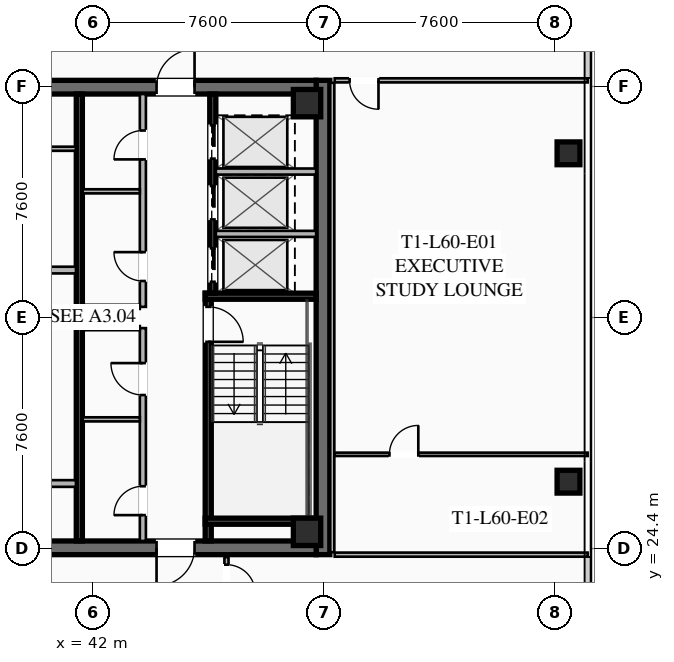
"""IFC4 building model, lengths in metres.
Left out: names, types, materials, properties, quantities, classifications, styles, units other than length and angle.
Written with IfcOpenShell. Run it as: python <this file> out.ifc"""

import sys

from ifc_helpers import new_model, si_unit, direction, frame, frame_2d, origin, origin_2d, place, context, subcontext, project, spatial, rectangle, hollow_rectangle, extrude, element, fill, save


model = new_model("IFC4")
c1 = context("Model", 3, precision=1e-05, world=origin(), true_north=direction((0.0, 1.0)))
c2 = subcontext(c1, "Body", "Model", "MODEL_VIEW")
j1 = project(units=[si_unit("LENGTHUNIT", "METRE"), si_unit("PLANEANGLEUNIT", "RADIAN")], contexts=[c1])
p1 = place(None, origin())
s1 = spatial("IfcSite", under=j1, at=p1, CompositionType="ELEMENT")
p2 = place(p1, origin())
s2 = spatial("IfcBuilding", under=s1, at=p2, CompositionType="ELEMENT")
p3 = place(p2, frame((0.0, 0.0, 221.95)))
s3 = spatial("IfcBuildingStorey", under=s2, at=p3, CompositionType="ELEMENT", Elevation=221.95)
p4 = place(p3, frame((49.575, 39.8, 0.0), z_axis=(0.0, 0.0, 1.0), x_axis=(0.0, -1.0, 0.0)))
e1 = element("IfcWall", 1, at=p4, inside=s3, PredefinedType="SHEAR", context=c2, shape_type="SweptSolid", body=[
    extrude(rectangle(XDim=15.6, YDim=0.45, at=frame_2d((7.8, 0.0))), origin(), (0.0, 0.0, 1.0), 3.55),
])
p5 = place(p3, frame((49.35, 24.425, 0.0), z_axis=(0.0, 0.0, 1.0), x_axis=(-1.0, 0.0, 0.0)))
e2 = element("IfcWall", 2, at=p5, inside=s3, PredefinedType="SHEAR", context=c2, shape_type="SweptSolid", body=[
    extrude(rectangle(XDim=14.7, YDim=0.45, at=frame_2d((7.35, 0.0))), origin(), (0.0, 0.0, 1.0), 3.55),
])
p6 = place(p5, frame((9.05, 0.0, 0.0)))
e3 = element("IfcOpeningElement", 3, at=p6, cuts=e2, PredefinedType="OPENING", context=c2, shape_type="SweptSolid", body=[
    extrude(rectangle(XDim=1.25, YDim=2.25, at=frame_2d((0.625, 1.125))), frame((0.0, 0.235, 0.0), z_axis=(0.0, -1.0, 0.0), x_axis=(1.0, 0.0, 0.0)), (0.0, 0.0, 1.0), 0.47),
])
p7 = place(p5, frame((4.0, 0.0, 0.0)))
e4 = element("IfcOpeningElement", 4, at=p7, cuts=e2, PredefinedType="OPENING", context=c2, shape_type="SweptSolid", body=[
    extrude(rectangle(XDim=1.25, YDim=2.25, at=frame_2d((0.625, 1.125))), frame((0.0, 0.235, 0.0), z_axis=(0.0, -1.0, 0.0), x_axis=(1.0, 0.0, 0.0)), (0.0, 0.0, 1.0), 0.47),
])
p8 = place(p3, frame((34.65, 39.575, 0.0), z_axis=(0.0, 0.0, 1.0), x_axis=(1.0, 0.0, 0.0)))
e5 = element("IfcWall", 5, at=p8, inside=s3, PredefinedType="SHEAR", context=c2, shape_type="SweptSolid", body=[
    extrude(rectangle(XDim=14.7, YDim=0.45, at=frame_2d((7.35, 0.0))), origin(), (0.0, 0.0, 1.0), 3.55),
])
p9 = place(p8, frame((4.4, 0.0, 0.0)))
e6 = element("IfcOpeningElement", 6, at=p9, cuts=e5, PredefinedType="OPENING", context=c2, shape_type="SweptSolid", body=[
    extrude(rectangle(XDim=1.25, YDim=2.25, at=frame_2d((0.625, 1.125))), frame((0.0, 0.235, 0.0), z_axis=(0.0, -1.0, 0.0), x_axis=(1.0, 0.0, 0.0)), (0.0, 0.0, 1.0), 0.47),
])
p10 = place(p8, frame((9.45, 0.0, 0.0)))
e7 = element("IfcOpeningElement", 7, at=p10, cuts=e5, PredefinedType="OPENING", context=c2, shape_type="SweptSolid", body=[
    extrude(rectangle(XDim=1.25, YDim=2.25, at=frame_2d((0.625, 1.125))), frame((0.0, 0.235, 0.0), z_axis=(0.0, -1.0, 0.0), x_axis=(1.0, 0.0, 0.0)), (0.0, 0.0, 1.0), 0.47),
])
for number, where, z_axis, x_axis in (
    (8, (49.05, 24.95, 0.0), (0.0, 0.0, 1.0), (1.0, 0.0, 0.0)),
    (9, (49.05, 39.05, 0.0), (0.0, 0.0, 1.0), (1.0, 0.0, 0.0)),
):
    element("IfcColumn", number, at=place(p3, frame(where, z_axis=z_axis, x_axis=x_axis)), inside=s3, PredefinedType="COLUMN", context=c2, shape_type="SweptSolid", body=[
        extrude(hollow_rectangle(XDim=0.9, YDim=0.9, WallThickness=0.04, at=origin_2d()), origin(), (0.0, 0.0, 1.0), 3.37),
    ])
for number, where, z_axis, x_axis in (
    (10, (57.65, 26.6, 0.0), (0.0, 0.0, 1.0), (1.0, 0.0, 0.0)),
    (11, (57.65, 37.4, 0.0), (0.0, 0.0, 1.0), (1.0, 0.0, 0.0)),
):
    element("IfcColumn", number, at=place(p3, frame(where, z_axis=z_axis, x_axis=x_axis)), inside=s3, PredefinedType="COLUMN", context=c2, shape_type="SweptSolid", body=[
        extrude(hollow_rectangle(XDim=0.75, YDim=0.75, WallThickness=0.032, at=origin_2d()), origin(), (0.0, 0.0, 1.0), 3.37),
    ])
p11 = place(p3, frame((45.8, 32.8, 0.0), z_axis=(0.0, 0.0, 1.0), x_axis=(0.0, -1.0, 0.0)))
e12 = element("IfcWall", 12, at=p11, inside=s3, PredefinedType="SHEAR", context=c2, shape_type="SweptSolid", body=[
    extrude(rectangle(XDim=8.15, YDim=0.2, at=frame_2d((4.075, 0.0))), origin(), (0.0, 0.0, 1.0), 3.37),
])
p12 = place(p11, frame((0.45, 0.0, 0.0)))
e13 = element("IfcOpeningElement", 13, at=p12, cuts=e12, PredefinedType="OPENING", context=c2, shape_type="SweptSolid", body=[
    extrude(rectangle(XDim=1.15, YDim=2.2, at=frame_2d((0.575, 1.1))), frame((0.0, 0.11, 0.0), z_axis=(0.0, -1.0, 0.0), x_axis=(1.0, 0.0, 0.0)), (0.0, 0.0, 1.0), 0.22),
])
for number, where, z_axis, x_axis in (
    (14, (45.7, 32.7, 0.0), (0.0, 0.0, 1.0), (1.0, 0.0, 0.0)),
    (15, (45.7, 25.3, 0.0), (0.0, 0.0, 1.0), (1.0, 0.0, 0.0)),
):
    element("IfcWall", number, at=place(p3, frame(where, z_axis=z_axis, x_axis=x_axis)), inside=s3, PredefinedType="SHEAR", context=c2, shape_type="SweptSolid", body=[
        extrude(rectangle(XDim=3.65, YDim=0.2, at=frame_2d((1.825, 0.0))), origin(), (0.0, 0.0, 1.0), 3.37),
    ])
p13 = place(p3, frame((41.56, 24.65, 0.0), z_axis=(0.0, 0.0, 1.0), x_axis=(0.0, 1.0, 0.0)))
e16 = element("IfcWall", 16, at=p13, inside=s3, PredefinedType="SHEAR", context=c2, shape_type="SweptSolid", body=[
    extrude(rectangle(XDim=14.7, YDim=0.2, at=frame_2d((7.35, 0.0))), origin(), (0.0, 0.0, 1.0), 3.37),
])
p14 = place(p3, frame((38.3, 33.56, 0.0), z_axis=(0.0, 0.0, 1.0), x_axis=(1.0, 0.0, 0.0)))
e17 = element("IfcWall", 17, at=p14, inside=s3, PredefinedType="SOLIDWALL", context=c2, shape_type="SweptSolid", body=[
    extrude(rectangle(XDim=3.15, YDim=0.22, at=frame_2d((1.575, 0.0))), origin(), (0.0, 0.0, 1.0), 2.723),
])
p15 = place(p3, frame((38.3, 26.54, 0.0), z_axis=(0.0, 0.0, 1.0), x_axis=(1.0, 0.0, 0.0)))
e18 = element("IfcWall", 18, at=p15, inside=s3, PredefinedType="SOLIDWALL", context=c2, shape_type="SweptSolid", body=[
    extrude(rectangle(XDim=3.15, YDim=0.22, at=frame_2d((1.575, 0.0))), origin(), (0.0, 0.0, 1.0), 2.723),
])
p16 = place(p15, frame((0.95, 0.0, 0.0)))
e19 = element("IfcOpeningElement", 19, at=p16, cuts=e18, PredefinedType="OPENING", context=c2, shape_type="SweptSolid", body=[
    extrude(rectangle(XDim=1.25, YDim=2.25, at=frame_2d((0.625, 1.125))), frame((0.0, 0.12, 0.0), z_axis=(0.0, -1.0, 0.0), x_axis=(1.0, 0.0, 0.0)), (0.0, 0.0, 1.0), 0.24),
])
p17 = place(p3, frame((45.95, 39.35, 0.0), z_axis=(0.0, 0.0, 1.0), x_axis=(0.0, -1.0, 0.0)))
e20 = element("IfcWall", 20, at=p17, inside=s3, PredefinedType="SHEAR", context=c2, shape_type="SweptSolid", body=[
    extrude(rectangle(XDim=6.55, YDim=0.2, at=frame_2d((3.275, 0.0))), origin(), (0.0, 0.0, 1.0), 3.37),
])
p18 = place(p17, frame((5.075, 0.0, 0.0)))
e21 = element("IfcOpeningElement", 21, at=p18, cuts=e20, PredefinedType="OPENING", context=c2, shape_type="SweptSolid", body=[
    extrude(rectangle(XDim=1.1, YDim=2.2, at=frame_2d((0.55, 1.1))), frame((0.0, 0.11, 0.0), z_axis=(0.0, -1.0, 0.0), x_axis=(1.0, 0.0, 0.0)), (0.0, 0.0, 1.0), 0.22),
])
p19 = place(p17, frame((3.025, 0.0, 0.0)))
e22 = element("IfcOpeningElement", 22, at=p19, cuts=e20, PredefinedType="OPENING", context=c2, shape_type="SweptSolid", body=[
    extrude(rectangle(XDim=1.1, YDim=2.2, at=frame_2d((0.55, 1.1))), frame((0.0, 0.11, 0.0), z_axis=(0.0, -1.0, 0.0), x_axis=(1.0, 0.0, 0.0)), (0.0, 0.0, 1.0), 0.22),
])
p20 = place(p17, frame((1.025, 0.0, 0.0)))
e23 = element("IfcOpeningElement", 23, at=p20, cuts=e20, PredefinedType="OPENING", context=c2, shape_type="SweptSolid", body=[
    extrude(rectangle(XDim=1.1, YDim=2.2, at=frame_2d((0.55, 1.1))), frame((0.0, 0.11, 0.0), z_axis=(0.0, -1.0, 0.0), x_axis=(1.0, 0.0, 0.0)), (0.0, 0.0, 1.0), 0.22),
])
for number, where, z_axis, x_axis in (
    (24, (46.05, 34.75, 0.0), (0.0, 0.0, 1.0), (1.0, 0.0, 0.0)),
    (25, (46.05, 36.8, 0.0), (0.0, 0.0, 1.0), (1.0, 0.0, 0.0)),
):
    element("IfcWall", number, at=place(p3, frame(where, z_axis=z_axis, x_axis=x_axis)), inside=s3, PredefinedType="SOLIDWALL", context=c2, shape_type="SweptSolid", body=[
        extrude(rectangle(XDim=3.3, YDim=0.2, at=frame_2d((1.65, 0.0))), origin(), (0.0, 0.0, 1.0), 3.37),
    ])
p21 = place(p3, frame((38.3, 37.55, 0.0), z_axis=(0.0, 0.0, 1.0), x_axis=(1.0, 0.0, 0.0)))
e26 = element("IfcWall", 26, at=p21, inside=s3, PredefinedType="PARTITIONING", context=c2, shape_type="SweptSolid", body=[
    extrude(rectangle(XDim=3.15, YDim=0.135, at=frame_2d((1.575, 0.0))), origin(), (0.0, 0.0, 1.0), 2.723),
])
p22 = place(p21, frame((1.05, 0.0, 0.0)))
e27 = element("IfcOpeningElement", 27, at=p22, cuts=e26, PredefinedType="OPENING", context=c2, shape_type="SweptSolid", body=[
    extrude(rectangle(XDim=1.05, YDim=2.2, at=frame_2d((0.525, 1.1))), frame((0.0, 0.077, 0.0), z_axis=(0.0, -1.0, 0.0), x_axis=(1.0, 0.0, 0.0)), (0.0, 0.0, 1.0), 0.155),
])
p23 = place(p3, frame((43.65, 24.65, 0.0), z_axis=(0.0, 0.0, 1.0), x_axis=(0.0, 1.0, 0.0)))
e28 = element("IfcWall", 28, at=p23, inside=s3, PredefinedType="SOLIDWALL", context=c2, shape_type="SweptSolid", body=[
    extrude(rectangle(XDim=7.0, YDim=0.2, at=frame_2d((3.5, 0.0))), origin(), (0.0, 0.0, 1.0), 2.723),
])
p24 = place(p23, frame((0.85, 0.0, 0.0)))
e29 = element("IfcOpeningElement", 29, at=p24, cuts=e28, PredefinedType="OPENING", context=c2, shape_type="SweptSolid", body=[
    extrude(rectangle(XDim=0.95, YDim=2.05, at=frame_2d((0.475, 1.025))), frame((0.0, 0.11, 0.0), z_axis=(0.0, -1.0, 0.0), x_axis=(1.0, 0.0, 0.0)), (0.0, 0.0, 1.0), 0.22),
])
p25 = place(p23, frame((4.8, 0.0, 0.0)))
e30 = element("IfcOpeningElement", 30, at=p25, cuts=e28, PredefinedType="OPENING", context=c2, shape_type="SweptSolid", body=[
    extrude(rectangle(XDim=1.05, YDim=2.2, at=frame_2d((0.525, 1.1))), frame((0.0, 0.11, 0.0), z_axis=(0.0, -1.0, 0.0), x_axis=(1.0, 0.0, 0.0)), (0.0, 0.0, 1.0), 0.22),
])
for number, where, z_axis, x_axis in (
    (31, (41.67, 31.65, 0.0), (0.0, 0.0, 1.0), (1.0, 0.0, 0.0)),
    (32, (41.67, 28.65, 0.0), (0.0, 0.0, 1.0), (1.0, 0.0, 0.0)),
):
    element("IfcWall", number, at=place(p3, frame(where, z_axis=z_axis, x_axis=x_axis)), inside=s3, PredefinedType="PARTITIONING", context=c2, shape_type="SweptSolid", body=[
        extrude(rectangle(XDim=1.88, YDim=0.135, at=frame_2d((0.94, 0.0))), origin(), (0.0, 0.0, 1.0), 2.723),
    ])
p26 = place(p3, frame((43.65, 32.35, 0.0), z_axis=(0.0, 0.0, 1.0), x_axis=(0.0, 1.0, 0.0)))
e33 = element("IfcWall", 33, at=p26, inside=s3, PredefinedType="SOLIDWALL", context=c2, shape_type="SweptSolid", body=[
    extrude(rectangle(XDim=7.0, YDim=0.2, at=frame_2d((3.5, 0.0))), origin(), (0.0, 0.0, 1.0), 2.723),
])
p27 = place(p26, frame((0.85, 0.0, 0.0)))
e34 = element("IfcOpeningElement", 34, at=p27, cuts=e33, PredefinedType="OPENING", context=c2, shape_type="SweptSolid", body=[
    extrude(rectangle(XDim=0.95, YDim=2.05, at=frame_2d((0.475, 1.025))), frame((0.0, 0.11, 0.0), z_axis=(0.0, -1.0, 0.0), x_axis=(1.0, 0.0, 0.0)), (0.0, 0.0, 1.0), 0.22),
])
p28 = place(p26, frame((4.85, 0.0, 0.0)))
e35 = element("IfcOpeningElement", 35, at=p28, cuts=e33, PredefinedType="OPENING", context=c2, shape_type="SweptSolid", body=[
    extrude(rectangle(XDim=0.95, YDim=2.05, at=frame_2d((0.475, 1.025))), frame((0.0, 0.11, 0.0), z_axis=(0.0, -1.0, 0.0), x_axis=(1.0, 0.0, 0.0)), (0.0, 0.0, 1.0), 0.22),
])
for number, where, z_axis, x_axis in (
    (36, (41.67, 32.35, 0.0), (0.0, 0.0, 1.0), (1.0, 0.0, 0.0)),
    (37, (41.67, 36.15, 0.0), (0.0, 0.0, 1.0), (1.0, 0.0, 0.0)),
):
    element("IfcWall", number, at=place(p3, frame(where, z_axis=z_axis, x_axis=x_axis)), inside=s3, PredefinedType="PARTITIONING", context=c2, shape_type="SweptSolid", body=[
        extrude(rectangle(XDim=1.88, YDim=0.135, at=frame_2d((0.94, 0.0))), origin(), (0.0, 0.0, 1.0), 2.723),
    ])
p29 = place(p3, frame((46.4, 24.12, 0.0), z_axis=(0.0, 0.0, 1.0), x_axis=(0.0, -1.0, 0.0)))
e38 = element("IfcWall", 38, at=p29, inside=s3, PredefinedType="PARTITIONING", context=c2, shape_type="SweptSolid", body=[
    extrude(rectangle(XDim=3.29, YDim=0.135, at=frame_2d((1.645, 0.0))), origin(), (0.0, 0.0, 1.0), 2.723),
])
p30 = place(p29, frame((0.25, 0.0, 0.0)))
e39 = element("IfcOpeningElement", 39, at=p30, cuts=e38, PredefinedType="OPENING", context=c2, shape_type="SweptSolid", body=[
    extrude(rectangle(XDim=0.95, YDim=2.05, at=frame_2d((0.475, 1.025))), frame((0.0, 0.077, 0.0), z_axis=(0.0, -1.0, 0.0), x_axis=(1.0, 0.0, 0.0)), (0.0, 0.0, 1.0), 0.155),
])
p31 = place(p3, frame((49.88, 39.72, 0.0), z_axis=(0.0, 0.0, 1.0), x_axis=(0.0, -1.0, 0.0)))
e40 = element("IfcWall", 40, at=p31, inside=s3, PredefinedType="PARTITIONING", context=c2, shape_type="SweptSolid", body=[
    extrude(rectangle(XDim=15.44, YDim=0.135, at=frame_2d((7.72, 0.0))), origin(), (0.0, 0.0, 1.0), 2.723),
])
p32 = place(p3, frame((58.28, 39.8, 0.0), z_axis=(0.0, 0.0, 1.0), x_axis=(-1.0, 0.0, 0.0)))
e41 = element("IfcWall", 41, at=p32, inside=s3, PredefinedType="PARTITIONING", context=c2, shape_type="SweptSolid", body=[
    extrude(rectangle(XDim=8.32, YDim=0.135, at=frame_2d((4.16, 0.0))), origin(), (0.0, 0.0, 1.0), 2.723),
])
p33 = place(p32, frame((6.88, 0.0, 0.0)))
e42 = element("IfcOpeningElement", 42, at=p33, cuts=e41, PredefinedType="OPENING", context=c2, shape_type="SweptSolid", body=[
    extrude(rectangle(XDim=0.95, YDim=2.05, at=frame_2d((0.475, 1.025))), frame((0.0, 0.077, 0.0), z_axis=(0.0, -1.0, 0.0), x_axis=(1.0, 0.0, 0.0)), (0.0, 0.0, 1.0), 0.155),
])
p34 = place(p3, frame((49.96, 24.2, 0.0), z_axis=(0.0, 0.0, 1.0), x_axis=(1.0, 0.0, 0.0)))
e43 = element("IfcWall", 43, at=p34, inside=s3, PredefinedType="PARTITIONING", context=c2, shape_type="SweptSolid", body=[
    extrude(rectangle(XDim=8.32, YDim=0.135, at=frame_2d((4.16, 0.0))), origin(), (0.0, 0.0, 1.0), 2.723),
])
p35 = place(p3, frame((49.96, 27.5, 0.0), z_axis=(0.0, 0.0, 1.0), x_axis=(1.0, 0.0, 0.0)))
e44 = element("IfcWall", 44, at=p35, inside=s3, PredefinedType="PARTITIONING", context=c2, shape_type="SweptSolid", body=[
    extrude(rectangle(XDim=8.32, YDim=0.11, at=frame_2d((4.16, 0.0))), origin(), (0.0, 0.0, 1.0), 2.723),
])
p36 = place(p35, frame((1.8, 0.0, 0.0)))
e45 = element("IfcOpeningElement", 45, at=p36, cuts=e44, PredefinedType="OPENING", context=c2, shape_type="SweptSolid", body=[
    extrude(rectangle(XDim=0.95, YDim=2.05, at=frame_2d((0.475, 1.025))), frame((0.0, 0.065, 0.0), z_axis=(0.0, -1.0, 0.0), x_axis=(1.0, 0.0, 0.0)), (0.0, 0.0, 1.0), 0.13),
])
p37 = place(p10, origin())
e46 = element("IfcDoor", 46, at=p37, inside=s3, OperationType="SINGLE_SWING_RIGHT", PredefinedType="DOOR", context=c2, shape_type="SweptSolid", body=[
    extrude(rectangle(XDim=1.25, YDim=2.25, at=frame_2d((0.625, 1.125))), frame((0.0, 0.025, 0.0), z_axis=(0.0, -1.0, 0.0), x_axis=(1.0, 0.0, 0.0)), (0.0, 0.0, 1.0), 0.05),
])
fill(e7, e46)
p38 = place(p7, origin())
e47 = element("IfcDoor", 47, at=p38, inside=s3, OperationType="SINGLE_SWING_RIGHT", PredefinedType="DOOR", context=c2, shape_type="SweptSolid", body=[
    extrude(rectangle(XDim=1.25, YDim=2.25, at=frame_2d((0.625, 1.125))), frame((0.0, 0.025, 0.0), z_axis=(0.0, -1.0, 0.0), x_axis=(1.0, 0.0, 0.0)), (0.0, 0.0, 1.0), 0.05),
])
fill(e4, e47)
p39 = place(p12, origin())
e48 = element("IfcDoor", 48, at=p39, inside=s3, OperationType="SINGLE_SWING_RIGHT", PredefinedType="DOOR", context=c2, shape_type="SweptSolid", body=[
    extrude(rectangle(XDim=1.15, YDim=2.2, at=frame_2d((0.575, 1.1))), frame((0.0, 0.025, 0.0), z_axis=(0.0, -1.0, 0.0), x_axis=(1.0, 0.0, 0.0)), (0.0, 0.0, 1.0), 0.05),
])
fill(e13, e48)
p40 = place(p24, origin())
e49 = element("IfcDoor", 49, at=p40, inside=s3, OperationType="SINGLE_SWING_LEFT", PredefinedType="DOOR", context=c2, shape_type="SweptSolid", body=[
    extrude(rectangle(XDim=0.95, YDim=2.05, at=frame_2d((0.475, 1.025))), frame((0.0, 0.025, 0.0), z_axis=(0.0, -1.0, 0.0), x_axis=(1.0, 0.0, 0.0)), (0.0, 0.0, 1.0), 0.05),
])
fill(e29, e49)
p41 = place(p25, origin())
e50 = element("IfcDoor", 50, at=p41, inside=s3, OperationType="SINGLE_SWING_RIGHT", PredefinedType="DOOR", context=c2, shape_type="SweptSolid", body=[
    extrude(rectangle(XDim=1.05, YDim=2.2, at=frame_2d((0.525, 1.1))), frame((0.0, 0.025, 0.0), z_axis=(0.0, -1.0, 0.0), x_axis=(1.0, 0.0, 0.0)), (0.0, 0.0, 1.0), 0.05),
])
fill(e30, e50)
p42 = place(p27, origin())
e51 = element("IfcDoor", 51, at=p42, inside=s3, OperationType="SINGLE_SWING_RIGHT", PredefinedType="DOOR", context=c2, shape_type="SweptSolid", body=[
    extrude(rectangle(XDim=0.95, YDim=2.05, at=frame_2d((0.475, 1.025))), frame((0.0, 0.025, 0.0), z_axis=(0.0, -1.0, 0.0), x_axis=(1.0, 0.0, 0.0)), (0.0, 0.0, 1.0), 0.05),
])
fill(e34, e51)
p43 = place(p28, origin())
e52 = element("IfcDoor", 52, at=p43, inside=s3, OperationType="SINGLE_SWING_LEFT", PredefinedType="DOOR", context=c2, shape_type="SweptSolid", body=[
    extrude(rectangle(XDim=0.95, YDim=2.05, at=frame_2d((0.475, 1.025))), frame((0.0, 0.025, 0.0), z_axis=(0.0, -1.0, 0.0), x_axis=(1.0, 0.0, 0.0)), (0.0, 0.0, 1.0), 0.05),
])
fill(e35, e52)
p44 = place(p30, origin())
e53 = element("IfcDoor", 53, at=p44, inside=s3, OperationType="SINGLE_SWING_RIGHT", PredefinedType="DOOR", context=c2, shape_type="SweptSolid", body=[
    extrude(rectangle(XDim=0.95, YDim=2.05, at=frame_2d((0.475, 1.025))), frame((0.0, 0.025, 0.0), z_axis=(0.0, -1.0, 0.0), x_axis=(1.0, 0.0, 0.0)), (0.0, 0.0, 1.0), 0.05),
])
fill(e39, e53)
p45 = place(p33, origin())
e54 = element("IfcDoor", 54, at=p45, inside=s3, OperationType="SINGLE_SWING_LEFT", PredefinedType="DOOR", context=c2, shape_type="SweptSolid", body=[
    extrude(rectangle(XDim=0.95, YDim=2.05, at=frame_2d((0.475, 1.025))), frame((0.0, 0.025, 0.0), z_axis=(0.0, -1.0, 0.0), x_axis=(1.0, 0.0, 0.0)), (0.0, 0.0, 1.0), 0.05),
])
fill(e42, e54)
p46 = place(p36, origin())
e55 = element("IfcDoor", 55, at=p46, inside=s3, OperationType="SINGLE_SWING_RIGHT", PredefinedType="DOOR", context=c2, shape_type="SweptSolid", body=[
    extrude(rectangle(XDim=0.95, YDim=2.05, at=frame_2d((0.475, 1.025))), frame((0.0, 0.025, 0.0), z_axis=(0.0, -1.0, 0.0), x_axis=(1.0, 0.0, 0.0)), (0.0, 0.0, 1.0), 0.05),
])
fill(e45, e55)
p47 = place(p18, origin())
e56 = element("IfcDoor", 56, at=p47, inside=s3, OperationType="SLIDING_TO_LEFT", PredefinedType="DOOR", context=c2, shape_type="SweptSolid", body=[
    extrude(rectangle(XDim=1.1, YDim=2.2, at=frame_2d((0.55, 1.1))), frame((0.0, 0.025, 0.0), z_axis=(0.0, -1.0, 0.0), x_axis=(1.0, 0.0, 0.0)), (0.0, 0.0, 1.0), 0.05),
])
fill(e21, e56)
p48 = place(p19, origin())
e57 = element("IfcDoor", 57, at=p48, inside=s3, OperationType="SLIDING_TO_LEFT", PredefinedType="DOOR", context=c2, shape_type="SweptSolid", body=[
    extrude(rectangle(XDim=1.1, YDim=2.2, at=frame_2d((0.55, 1.1))), frame((0.0, 0.025, 0.0), z_axis=(0.0, -1.0, 0.0), x_axis=(1.0, 0.0, 0.0)), (0.0, 0.0, 1.0), 0.05),
])
fill(e22, e57)
p49 = place(p20, origin())
e58 = element("IfcDoor", 58, at=p49, inside=s3, OperationType="SLIDING_TO_LEFT", PredefinedType="DOOR", context=c2, shape_type="SweptSolid", body=[
    extrude(rectangle(XDim=1.1, YDim=2.2, at=frame_2d((0.55, 1.1))), frame((0.0, 0.025, 0.0), z_axis=(0.0, -1.0, 0.0), x_axis=(1.0, 0.0, 0.0)), (0.0, 0.0, 1.0), 0.05),
])
fill(e23, e58)
save(model, sys.argv[1])
